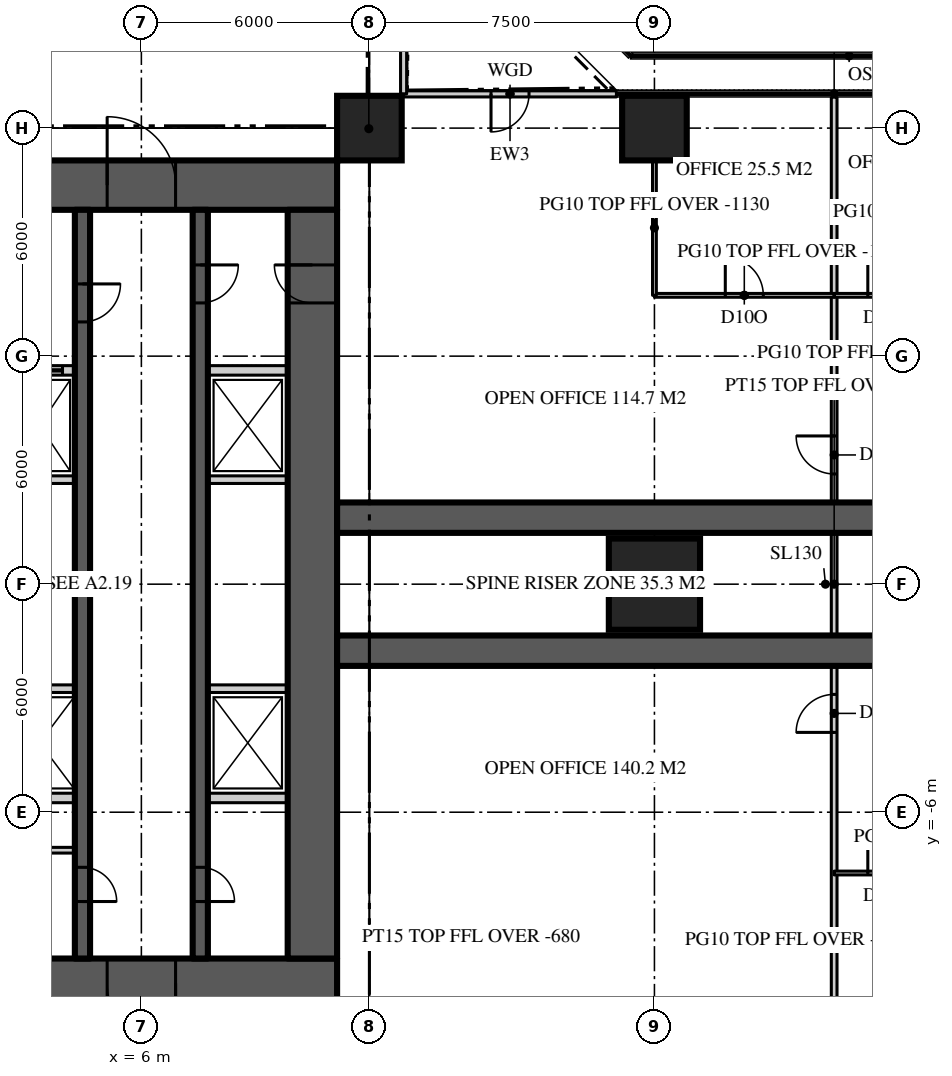
"""IFC4 building model, lengths in metres.
Left out: names, types, materials, properties, quantities, classifications, styles, units other than length and angle.
Written with IfcOpenShell. Run it as: python <this file> out.ifc"""

import sys

from ifc_helpers import new_model, si_unit, direction, frame, frame_2d, origin, origin_2d, place, context, subcontext, project, spatial, rectangle, extrude, element, fill, save


model = new_model("IFC4")
c1 = context("Model", 3, precision=1e-05, world=origin(), true_north=direction((0.0, 1.0)))
c2 = subcontext(c1, "Body", "Model", "MODEL_VIEW")
j1 = project(units=[si_unit("LENGTHUNIT", "METRE"), si_unit("PLANEANGLEUNIT", "RADIAN")], contexts=[c1])
p1 = place(None, origin())
s1 = spatial("IfcSite", under=j1, at=p1, CompositionType="ELEMENT")
p2 = place(p1, origin())
s2 = spatial("IfcBuilding", under=s1, at=p2, CompositionType="ELEMENT")
p3 = place(p2, frame((0.0, 0.0, 124.2)))
s3 = spatial("IfcBuildingStorey", under=s2, at=p3, CompositionType="ELEMENT", Elevation=124.2)
p4 = place(p3, frame((-11.15, 10.5, 0.0), z_axis=(0.0, 0.0, 1.0), x_axis=(1.0, 0.0, 0.0)))
e1 = element("IfcWall", 1, at=p4, inside=s3, PredefinedType="SHEAR", context=c2, shape_type="SweptSolid", body=[
    extrude(rectangle(XDim=22.3, YDim=1.3, at=frame_2d((11.15, 0.0))), origin(), (0.0, 0.0, 1.0), 3.9),
])
p5 = place(p4, frame((4.25, 0.0, 0.0)))
e2 = element("IfcOpeningElement", 2, at=p5, cuts=e1, PredefinedType="OPENING", context=c2, shape_type="SweptSolid", body=[
    extrude(rectangle(XDim=1.8, YDim=2.2, at=frame_2d((0.9, 1.1))), frame((0.0, 0.66, 0.0), z_axis=(0.0, -1.0, 0.0), x_axis=(1.0, 0.0, 0.0)), (0.0, 0.0, 1.0), 1.32),
])
p6 = place(p4, frame((16.25, 0.0, 0.0)))
e3 = element("IfcOpeningElement", 3, at=p6, cuts=e1, PredefinedType="OPENING", context=c2, shape_type="SweptSolid", body=[
    extrude(rectangle(XDim=1.8, YDim=2.2, at=frame_2d((0.9, 1.1))), frame((0.0, 0.66, 0.0), z_axis=(0.0, -1.0, 0.0), x_axis=(1.0, 0.0, 0.0)), (0.0, 0.0, 1.0), 1.32),
])
p7 = place(p3, frame((11.15, -10.5, 0.0), z_axis=(0.0, 0.0, 1.0), x_axis=(-1.0, 0.0, 0.0)))
e4 = element("IfcWall", 4, at=p7, inside=s3, PredefinedType="SHEAR", context=c2, shape_type="SweptSolid", body=[
    extrude(rectangle(XDim=22.3, YDim=1.3, at=frame_2d((11.15, 0.0))), origin(), (0.0, 0.0, 1.0), 3.9),
])
p8 = place(p7, frame((16.25, 0.0, 0.0)))
e5 = element("IfcOpeningElement", 5, at=p8, cuts=e4, PredefinedType="OPENING", context=c2, shape_type="SweptSolid", body=[
    extrude(rectangle(XDim=1.8, YDim=2.2, at=frame_2d((0.9, 1.1))), frame((0.0, 0.66, 0.0), z_axis=(0.0, -1.0, 0.0), x_axis=(1.0, 0.0, 0.0)), (0.0, 0.0, 1.0), 1.32),
])
p9 = place(p7, frame((4.25, 0.0, 0.0)))
e6 = element("IfcOpeningElement", 6, at=p9, cuts=e4, PredefinedType="OPENING", context=c2, shape_type="SweptSolid", body=[
    extrude(rectangle(XDim=1.8, YDim=2.2, at=frame_2d((0.9, 1.1))), frame((0.0, 0.66, 0.0), z_axis=(0.0, -1.0, 0.0), x_axis=(1.0, 0.0, 0.0)), (0.0, 0.0, 1.0), 1.32),
])
p10 = place(p3, frame((10.5, -9.85, 0.0), z_axis=(0.0, 0.0, 1.0), x_axis=(0.0, 1.0, 0.0)))
e7 = element("IfcWall", 7, at=p10, inside=s3, PredefinedType="SHEAR", context=c2, shape_type="SweptSolid", body=[
    extrude(rectangle(XDim=19.7, YDim=1.3, at=frame_2d((9.85, 0.0))), origin(), (0.0, 0.0, 1.0), 3.9),
])
p11 = place(p10, frame((17.25, 0.0, 0.0)))
e8 = element("IfcOpeningElement", 8, at=p11, cuts=e7, PredefinedType="OPENING", context=c2, shape_type="SweptSolid", body=[
    extrude(rectangle(XDim=1.0, YDim=2.2, at=frame_2d((0.5, 1.1))), frame((0.0, 0.66, 0.0), z_axis=(0.0, -1.0, 0.0), x_axis=(1.0, 0.0, 0.0)), (0.0, 0.0, 1.0), 1.32),
])
for number, where, z_axis, x_axis in (
    (9, (11.15, -1.75, 0.0), (0.0, 0.0, 1.0), (1.0, 0.0, 0.0)),
    (10, (11.15, 1.75, 0.0), (0.0, 0.0, 1.0), (1.0, 0.0, 0.0)),
):
    element("IfcWall", number, at=place(p3, frame(where, z_axis=z_axis, x_axis=x_axis)), inside=s3, PredefinedType="SHEAR", context=c2, shape_type="SweptSolid", body=[
        extrude(rectangle(XDim=15.25, YDim=0.8, at=frame_2d((7.625, 0.0))), origin(), (0.0, 0.0, 1.0), 3.9),
    ])
p12 = place(p3, frame((19.5, 0.0, 0.0), z_axis=(0.0, 0.0, 1.0), x_axis=(1.0, 0.0, 0.0)))
e11 = element("IfcColumn", 11, at=p12, inside=s3, PredefinedType="COLUMN", context=c2, shape_type="SweptSolid", body=[
    extrude(rectangle(XDim=2.4, YDim=2.4, at=origin_2d()), origin(), (0.0, 0.0, 1.0), 3.9),
])
for number, where, z_axis, x_axis in (
    (12, (12.0, 12.0, 0.0), (0.0, 0.0, 1.0), (1.0, 0.0, 0.0)),
    (13, (19.5, 12.0, 0.0), (0.0, 0.0, 1.0), (1.0, 0.0, 0.0)),
):
    element("IfcColumn", number, at=place(p3, frame(where, z_axis=z_axis, x_axis=x_axis)), inside=s3, PredefinedType="COLUMN", context=c2, shape_type="SweptSolid", body=[
        extrude(rectangle(XDim=1.7, YDim=1.7, at=origin_2d()), origin(), (0.0, 0.0, 1.0), 3.9),
    ])
p13 = place(p3, frame((18.5, 12.9, 0.0), z_axis=(0.0, 0.0, 1.0), x_axis=(-1.0, 0.0, 0.0)))
e14 = element("IfcWall", 14, at=p13, inside=s3, PredefinedType="SOLIDWALL", context=c2, shape_type="SweptSolid", body=[
    extrude(rectangle(XDim=5.6, YDim=0.16, at=frame_2d((2.8, 0.0))), origin(), (0.0, 0.0, 1.0), 3.77),
])
p14 = place(p13, frame((2.3, 0.0, 0.0)))
e15 = element("IfcOpeningElement", 15, at=p14, cuts=e14, PredefinedType="OPENING", context=c2, shape_type="SweptSolid", body=[
    extrude(rectangle(XDim=1.0, YDim=2.2, at=frame_2d((0.5, 1.1))), frame((0.0, 0.09, 0.0), z_axis=(0.0, -1.0, 0.0), x_axis=(1.0, 0.0, 0.0)), (0.0, 0.0, 1.0), 0.18),
])
p15 = place(p3, frame((12.9, 12.9, 0.0), z_axis=(0.0, 0.0, 1.0), x_axis=(0.0, 1.0, 0.0)))
e16 = element("IfcWall", 16, at=p15, inside=s3, PredefinedType="SOLIDWALL", context=c2, shape_type="SweptSolid", body=[
    extrude(rectangle(XDim=5.6, YDim=0.16, at=frame_2d((2.8, 0.0))), origin(), (0.0, 0.0, 1.0), 3.77),
])
p16 = place(p3, frame((7.55, 9.85, 0.0), z_axis=(0.0, 0.0, 1.0), x_axis=(0.0, -1.0, 0.0)))
e17 = element("IfcWall", 17, at=p16, inside=s3, PredefinedType="SHEAR", context=c2, shape_type="SweptSolid", body=[
    extrude(rectangle(XDim=19.7, YDim=0.4, at=frame_2d((9.85, 0.0))), origin(), (0.0, 0.0, 1.0), 3.9),
])
p17 = place(p16, frame((1.45, 0.0, 0.0)))
e18 = element("IfcOpeningElement", 18, at=p17, cuts=e17, PredefinedType="OPENING", context=c2, shape_type="SweptSolid", body=[
    extrude(rectangle(XDim=1.0, YDim=2.2, at=frame_2d((0.5, 1.1))), frame((0.0, 0.21, 0.0), z_axis=(0.0, -1.0, 0.0), x_axis=(1.0, 0.0, 0.0)), (0.0, 0.0, 1.0), 0.42),
])
p18 = place(p16, frame((17.3, 0.0, 0.0)))
e19 = element("IfcOpeningElement", 19, at=p18, cuts=e17, PredefinedType="OPENING", context=c2, shape_type="SweptSolid", body=[
    extrude(rectangle(XDim=0.9, YDim=2.1, at=frame_2d((0.45, 1.05))), frame((0.0, 0.21, 0.0), z_axis=(0.0, -1.0, 0.0), x_axis=(1.0, 0.0, 0.0)), (0.0, 0.0, 1.0), 0.42),
])
p19 = place(p3, frame((4.45, 9.85, 0.0), z_axis=(0.0, 0.0, 1.0), x_axis=(0.0, -1.0, 0.0)))
e20 = element("IfcWall", 20, at=p19, inside=s3, PredefinedType="SHEAR", context=c2, shape_type="SweptSolid", body=[
    extrude(rectangle(XDim=19.7, YDim=0.4, at=frame_2d((9.85, 0.0))), origin(), (0.0, 0.0, 1.0), 3.9),
])
p20 = place(p19, frame((1.95, 0.0, 0.0)))
e21 = element("IfcOpeningElement", 21, at=p20, cuts=e20, PredefinedType="OPENING", context=c2, shape_type="SweptSolid", body=[
    extrude(rectangle(XDim=1.0, YDim=2.2, at=frame_2d((0.5, 1.1))), frame((0.0, 0.21, 0.0), z_axis=(0.0, -1.0, 0.0), x_axis=(1.0, 0.0, 0.0)), (0.0, 0.0, 1.0), 0.42),
])
p21 = place(p19, frame((17.3, 0.0, 0.0)))
e22 = element("IfcOpeningElement", 22, at=p21, cuts=e20, PredefinedType="OPENING", context=c2, shape_type="SweptSolid", body=[
    extrude(rectangle(XDim=0.9, YDim=2.1, at=frame_2d((0.45, 1.05))), frame((0.0, 0.21, 0.0), z_axis=(0.0, -1.0, 0.0), x_axis=(1.0, 0.0, 0.0)), (0.0, 0.0, 1.0), 0.42),
])
p22 = place(p3, frame((2.4, 5.625, 0.0), z_axis=(0.0, 0.0, 1.0), x_axis=(1.0, 0.0, 0.0)))
e23 = element("IfcWall", 23, at=p22, inside=s3, PredefinedType="SOLIDWALL", context=c2, shape_type="SweptSolid", body=[
    extrude(rectangle(XDim=1.85, YDim=0.25, at=frame_2d((0.925, 0.0))), origin(), (0.0, 0.0, 1.0), 3.7),
])
p23 = place(p22, frame((0.325, 0.0, 0.0)))
e24 = element("IfcOpeningElement", 24, at=p23, cuts=e23, PredefinedType="OPENING", context=c2, shape_type="SweptSolid", body=[
    extrude(rectangle(XDim=1.2, YDim=2.2, at=frame_2d((0.6, 1.1))), frame((0.0, 0.135, 0.0), z_axis=(0.0, -1.0, 0.0), x_axis=(1.0, 0.0, 0.0)), (0.0, 0.0, 1.0), 0.27),
])
p24 = place(p3, frame((7.75, 5.625, 0.0), z_axis=(0.0, 0.0, 1.0), x_axis=(1.0, 0.0, 0.0)))
e25 = element("IfcWall", 25, at=p24, inside=s3, PredefinedType="SOLIDWALL", context=c2, shape_type="SweptSolid", body=[
    extrude(rectangle(XDim=2.1, YDim=0.25, at=frame_2d((1.05, 0.0))), origin(), (0.0, 0.0, 1.0), 3.7),
])
p25 = place(p3, frame((2.4, -5.625, 0.0), z_axis=(0.0, 0.0, 1.0), x_axis=(1.0, 0.0, 0.0)))
e26 = element("IfcWall", 26, at=p25, inside=s3, PredefinedType="SOLIDWALL", context=c2, shape_type="SweptSolid", body=[
    extrude(rectangle(XDim=1.85, YDim=0.25, at=frame_2d((0.925, 0.0))), origin(), (0.0, 0.0, 1.0), 3.7),
])
p26 = place(p3, frame((7.75, -5.625, 0.0), z_axis=(0.0, 0.0, 1.0), x_axis=(1.0, 0.0, 0.0)))
e27 = element("IfcWall", 27, at=p26, inside=s3, PredefinedType="SOLIDWALL", context=c2, shape_type="SweptSolid", body=[
    extrude(rectangle(XDim=2.1, YDim=0.25, at=frame_2d((1.05, 0.0))), origin(), (0.0, 0.0, 1.0), 3.7),
])
p27 = place(p3, frame((2.4, -2.75, 0.0), z_axis=(0.0, 0.0, 1.0), x_axis=(1.0, 0.0, 0.0)))
e28 = element("IfcWall", 28, at=p27, inside=s3, PredefinedType="SOLIDWALL", context=c2, shape_type="SweptSolid", body=[
    extrude(rectangle(XDim=1.85, YDim=0.2, at=frame_2d((0.925, 0.0))), origin(), (0.0, 0.0, 1.0), 3.7),
])
p28 = place(p3, frame((7.75, -2.75, 0.0), z_axis=(0.0, 0.0, 1.0), x_axis=(1.0, 0.0, 0.0)))
e29 = element("IfcWall", 29, at=p28, inside=s3, PredefinedType="SOLIDWALL", context=c2, shape_type="SweptSolid", body=[
    extrude(rectangle(XDim=2.1, YDim=0.2, at=frame_2d((1.05, 0.0))), origin(), (0.0, 0.0, 1.0), 3.7),
])
p29 = place(p3, frame((2.4, 2.75, 0.0), z_axis=(0.0, 0.0, 1.0), x_axis=(1.0, 0.0, 0.0)))
e30 = element("IfcWall", 30, at=p29, inside=s3, PredefinedType="SOLIDWALL", context=c2, shape_type="SweptSolid", body=[
    extrude(rectangle(XDim=1.85, YDim=0.2, at=frame_2d((0.925, 0.0))), origin(), (0.0, 0.0, 1.0), 3.7),
])
p30 = place(p3, frame((7.75, 2.75, 0.0), z_axis=(0.0, 0.0, 1.0), x_axis=(1.0, 0.0, 0.0)))
e31 = element("IfcWall", 31, at=p30, inside=s3, PredefinedType="SOLIDWALL", context=c2, shape_type="SweptSolid", body=[
    extrude(rectangle(XDim=2.1, YDim=0.2, at=frame_2d((1.05, 0.0))), origin(), (0.0, 0.0, 1.0), 3.7),
])
p31 = place(p3, frame((24.229, -12.82, 0.0), z_axis=(0.0, 0.0, 1.0), x_axis=(0.0, 1.0, 0.0)))
e32 = element("IfcWall", 32, at=p31, inside=s3, PredefinedType="PARTITIONING", context=c2, shape_type="SweptSolid", body=[
    extrude(rectangle(XDim=25.64, YDim=0.15, at=frame_2d((12.82, 0.0))), origin(), (0.0, 0.0, 1.0), 3.77),
])
p32 = place(p31, frame((15.72, 0.0, 0.0)))
e33 = element("IfcOpeningElement", 33, at=p32, cuts=e32, PredefinedType="OPENING", context=c2, shape_type="SweptSolid", body=[
    extrude(rectangle(XDim=1.0, YDim=2.2, at=frame_2d((0.5, 1.1))), frame((0.0, 0.085, 0.0), z_axis=(0.0, -1.0, 0.0), x_axis=(1.0, 0.0, 0.0)), (0.0, 0.0, 1.0), 0.17),
])
p33 = place(p31, frame((8.92, 0.0, 0.0)))
e34 = element("IfcOpeningElement", 34, at=p33, cuts=e32, PredefinedType="OPENING", context=c2, shape_type="SweptSolid", body=[
    extrude(rectangle(XDim=1.0, YDim=2.2, at=frame_2d((0.5, 1.1))), frame((0.0, 0.085, 0.0), z_axis=(0.0, -1.0, 0.0), x_axis=(1.0, 0.0, 0.0)), (0.0, 0.0, 1.0), 0.17),
])
p34 = place(p3, frame((19.5, 7.6, 0.0), z_axis=(0.0, 0.0, 1.0), x_axis=(1.0, 0.0, 0.0)))
e35 = element("IfcWall", 35, at=p34, inside=s3, PredefinedType="PARTITIONING", context=c2, shape_type="SweptSolid", body=[
    extrude(rectangle(XDim=4.729, YDim=0.1, at=frame_2d((2.365, 0.0))), origin(), (0.0, 0.0, 1.0), 3.77),
])
p35 = place(p34, frame((1.865, 0.0, 0.0)))
e36 = element("IfcOpeningElement", 36, at=p35, cuts=e35, PredefinedType="OPENING", context=c2, shape_type="SweptSolid", body=[
    extrude(rectangle(XDim=1.0, YDim=2.2, at=frame_2d((0.5, 1.1))), frame((0.0, 0.06, 0.0), z_axis=(0.0, -1.0, 0.0), x_axis=(1.0, 0.0, 0.0)), (0.0, 0.0, 1.0), 0.12),
])
p36 = place(p3, frame((24.229, 7.6, 0.0), z_axis=(0.0, 0.0, 1.0), x_axis=(1.0, 0.0, 0.0)))
e37 = element("IfcWall", 37, at=p36, inside=s3, PredefinedType="PARTITIONING", context=c2, shape_type="SweptSolid", body=[
    extrude(rectangle(XDim=5.73, YDim=0.1, at=frame_2d((2.865, 0.0))), origin(), (0.0, 0.0, 1.0), 3.77),
])
p37 = place(p36, frame((0.885, 0.0, 0.0)))
e38 = element("IfcOpeningElement", 38, at=p37, cuts=e37, PredefinedType="OPENING", context=c2, shape_type="SweptSolid", body=[
    extrude(rectangle(XDim=1.0, YDim=2.2, at=frame_2d((0.5, 1.1))), frame((0.0, 0.06, 0.0), z_axis=(0.0, -1.0, 0.0), x_axis=(1.0, 0.0, 0.0)), (0.0, 0.0, 1.0), 0.12),
])
p38 = place(p36, frame((3.75, 0.0, 0.0)))
e39 = element("IfcOpeningElement", 39, at=p38, cuts=e37, PredefinedType="OPENING", context=c2, shape_type="SweptSolid", body=[
    extrude(rectangle(XDim=1.0, YDim=2.2, at=frame_2d((0.5, 1.1))), frame((0.0, 0.06, 0.0), z_axis=(0.0, -1.0, 0.0), x_axis=(1.0, 0.0, 0.0)), (0.0, 0.0, 1.0), 0.12),
])
p39 = place(p3, frame((19.5, 7.6, 0.0), z_axis=(0.0, 0.0, 1.0), x_axis=(0.0, 1.0, 0.0)))
e40 = element("IfcWall", 40, at=p39, inside=s3, PredefinedType="PARTITIONING", context=c2, shape_type="SweptSolid", body=[
    extrude(rectangle(XDim=3.55, YDim=0.1, at=frame_2d((1.775, 0.0))), origin(), (0.0, 0.0, 1.0), 2.77),
])
p40 = place(p3, frame((24.229, -7.6, 0.0), z_axis=(0.0, 0.0, 1.0), x_axis=(1.0, 0.0, 0.0)))
e41 = element("IfcWall", 41, at=p40, inside=s3, PredefinedType="PARTITIONING", context=c2, shape_type="SweptSolid", body=[
    extrude(rectangle(XDim=5.73, YDim=0.1, at=frame_2d((2.865, 0.0))), origin(), (0.0, 0.0, 1.0), 3.77),
])
p41 = place(p40, frame((0.885, 0.0, 0.0)))
e42 = element("IfcOpeningElement", 42, at=p41, cuts=e41, PredefinedType="OPENING", context=c2, shape_type="SweptSolid", body=[
    extrude(rectangle(XDim=1.0, YDim=2.2, at=frame_2d((0.5, 1.1))), frame((0.0, 0.06, 0.0), z_axis=(0.0, -1.0, 0.0), x_axis=(1.0, 0.0, 0.0)), (0.0, 0.0, 1.0), 0.12),
])
p42 = place(p40, frame((3.75, 0.0, 0.0)))
e43 = element("IfcOpeningElement", 43, at=p42, cuts=e41, PredefinedType="OPENING", context=c2, shape_type="SweptSolid", body=[
    extrude(rectangle(XDim=1.0, YDim=2.2, at=frame_2d((0.5, 1.1))), frame((0.0, 0.06, 0.0), z_axis=(0.0, -1.0, 0.0), x_axis=(1.0, 0.0, 0.0)), (0.0, 0.0, 1.0), 0.12),
])
p43 = place(p3, frame((11.15, 11.15, 0.0), z_axis=(0.0, 0.0, 1.0), x_axis=(0.707106781187, 0.707106781187, 0.0)))
e44 = element("IfcWall", 44, at=p43, inside=s3, PredefinedType="PARTITIONING", context=c2, shape_type="SweptSolid", body=[
    extrude(rectangle(XDim=2.362, YDim=0.15, at=frame_2d((1.181, 0.0))), origin(), (0.0, 0.0, 1.0), 3.22),
])
p44 = place(p3, frame((2.4, -7.0, 0.0), z_axis=(0.0, 0.0, 1.0), x_axis=(1.0, 0.0, 0.0)))
e45 = element("IfcWall", 45, at=p44, inside=s3, PredefinedType="SOLIDWALL", context=c2, shape_type="SweptSolid", body=[
    extrude(rectangle(XDim=1.85, YDim=0.15, at=frame_2d((0.925, 0.0))), origin(), (0.0, 0.0, 1.0), 3.77),
])
p45 = place(p44, frame((0.1, 0.0, 0.0)))
e46 = element("IfcOpeningElement", 46, at=p45, cuts=e45, PredefinedType="OPENING", context=c2, shape_type="SweptSolid", body=[
    extrude(rectangle(XDim=0.9, YDim=2.1, at=frame_2d((0.45, 1.05))), frame((0.0, 0.085, 0.0), z_axis=(0.0, -1.0, 0.0), x_axis=(1.0, 0.0, 0.0)), (0.0, 0.0, 1.0), 0.17),
])
p46 = place(p14, origin())
e47 = element("IfcDoor", 47, at=p46, inside=s3, OperationType="SINGLE_SWING_RIGHT", PredefinedType="DOOR", context=c2, shape_type="SweptSolid", body=[
    extrude(rectangle(XDim=1.0, YDim=2.2, at=frame_2d((0.5, 1.1))), frame((0.0, 0.025, 0.0), z_axis=(0.0, -1.0, 0.0), x_axis=(1.0, 0.0, 0.0)), (0.0, 0.0, 1.0), 0.05),
])
fill(e15, e47)
p47 = place(p6, origin())
e48 = element("IfcDoor", 48, at=p47, inside=s3, OperationType="DOUBLE_DOOR_DOUBLE_SWING", PredefinedType="DOOR", context=c2, shape_type="SweptSolid", body=[
    extrude(rectangle(XDim=1.8, YDim=2.2, at=frame_2d((0.9, 1.1))), frame((0.0, 0.025, 0.0), z_axis=(0.0, -1.0, 0.0), x_axis=(1.0, 0.0, 0.0)), (0.0, 0.0, 1.0), 0.05),
])
fill(e3, e48)
p48 = place(p9, origin())
e49 = element("IfcDoor", 49, at=p48, inside=s3, OperationType="DOUBLE_DOOR_DOUBLE_SWING", PredefinedType="DOOR", context=c2, shape_type="SweptSolid", body=[
    extrude(rectangle(XDim=1.8, YDim=2.2, at=frame_2d((0.9, 1.1))), frame((0.0, 0.025, 0.0), z_axis=(0.0, -1.0, 0.0), x_axis=(1.0, 0.0, 0.0)), (0.0, 0.0, 1.0), 0.05),
])
fill(e6, e49)
p49 = place(p17, origin())
e50 = element("IfcDoor", 50, at=p49, inside=s3, OperationType="SINGLE_SWING_LEFT", PredefinedType="DOOR", context=c2, shape_type="SweptSolid", body=[
    extrude(rectangle(XDim=1.0, YDim=2.2, at=frame_2d((0.5, 1.1))), frame((0.0, 0.025, 0.0), z_axis=(0.0, -1.0, 0.0), x_axis=(1.0, 0.0, 0.0)), (0.0, 0.0, 1.0), 0.05),
])
fill(e18, e50)
p50 = place(p11, origin())
e51 = element("IfcDoor", 51, at=p50, inside=s3, OperationType="SINGLE_SWING_RIGHT", PredefinedType="DOOR", context=c2, shape_type="SweptSolid", body=[
    extrude(rectangle(XDim=1.0, YDim=2.2, at=frame_2d((0.5, 1.1))), frame((0.0, 0.025, 0.0), z_axis=(0.0, -1.0, 0.0), x_axis=(1.0, 0.0, 0.0)), (0.0, 0.0, 1.0), 0.05),
])
fill(e8, e51)
p51 = place(p20, origin())
e52 = element("IfcDoor", 52, at=p51, inside=s3, OperationType="SINGLE_SWING_LEFT", PredefinedType="DOOR", context=c2, shape_type="SweptSolid", body=[
    extrude(rectangle(XDim=1.0, YDim=2.2, at=frame_2d((0.5, 1.1))), frame((0.0, 0.025, 0.0), z_axis=(0.0, -1.0, 0.0), x_axis=(1.0, 0.0, 0.0)), (0.0, 0.0, 1.0), 0.05),
])
fill(e21, e52)
p52 = place(p18, origin())
e53 = element("IfcDoor", 53, at=p52, inside=s3, OperationType="SINGLE_SWING_RIGHT", PredefinedType="DOOR", context=c2, shape_type="SweptSolid", body=[
    extrude(rectangle(XDim=0.9, YDim=2.1, at=frame_2d((0.45, 1.05))), frame((0.0, 0.025, 0.0), z_axis=(0.0, -1.0, 0.0), x_axis=(1.0, 0.0, 0.0)), (0.0, 0.0, 1.0), 0.05),
])
fill(e19, e53)
p53 = place(p21, origin())
e54 = element("IfcDoor", 54, at=p53, inside=s3, OperationType="SINGLE_SWING_RIGHT", PredefinedType="DOOR", context=c2, shape_type="SweptSolid", body=[
    extrude(rectangle(XDim=0.9, YDim=2.1, at=frame_2d((0.45, 1.05))), frame((0.0, 0.025, 0.0), z_axis=(0.0, -1.0, 0.0), x_axis=(1.0, 0.0, 0.0)), (0.0, 0.0, 1.0), 0.05),
])
fill(e22, e54)
p54 = place(p23, origin())
e55 = element("IfcDoor", 55, at=p54, inside=s3, OperationType="SLIDING_TO_LEFT", PredefinedType="DOOR", context=c2, shape_type="SweptSolid", body=[
    extrude(rectangle(XDim=1.2, YDim=2.2, at=frame_2d((0.6, 1.1))), frame((0.0, 0.025, 0.0), z_axis=(0.0, -1.0, 0.0), x_axis=(1.0, 0.0, 0.0)), (0.0, 0.0, 1.0), 0.05),
])
fill(e24, e55)
p55 = place(p32, origin())
e56 = element("IfcDoor", 56, at=p55, inside=s3, OperationType="SINGLE_SWING_RIGHT", PredefinedType="DOOR", context=c2, shape_type="SweptSolid", body=[
    extrude(rectangle(XDim=1.0, YDim=2.2, at=frame_2d((0.5, 1.1))), frame((0.0, 0.025, 0.0), z_axis=(0.0, -1.0, 0.0), x_axis=(1.0, 0.0, 0.0)), (0.0, 0.0, 1.0), 0.05),
])
fill(e33, e56)
p56 = place(p33, origin())
e57 = element("IfcDoor", 57, at=p56, inside=s3, OperationType="SINGLE_SWING_LEFT", PredefinedType="DOOR", context=c2, shape_type="SweptSolid", body=[
    extrude(rectangle(XDim=1.0, YDim=2.2, at=frame_2d((0.5, 1.1))), frame((0.0, 0.025, 0.0), z_axis=(0.0, -1.0, 0.0), x_axis=(1.0, 0.0, 0.0)), (0.0, 0.0, 1.0), 0.05),
])
fill(e34, e57)
p57 = place(p35, origin())
e58 = element("IfcDoor", 58, at=p57, inside=s3, OperationType="SINGLE_SWING_LEFT", PredefinedType="DOOR", context=c2, shape_type="SweptSolid", body=[
    extrude(rectangle(XDim=1.0, YDim=2.2, at=frame_2d((0.5, 1.1))), frame((0.0, 0.025, 0.0), z_axis=(0.0, -1.0, 0.0), x_axis=(1.0, 0.0, 0.0)), (0.0, 0.0, 1.0), 0.05),
])
fill(e36, e58)
p58 = place(p37, origin())
e59 = element("IfcDoor", 59, at=p58, inside=s3, OperationType="SINGLE_SWING_LEFT", PredefinedType="DOOR", context=c2, shape_type="SweptSolid", body=[
    extrude(rectangle(XDim=1.0, YDim=2.2, at=frame_2d((0.5, 1.1))), frame((0.0, 0.025, 0.0), z_axis=(0.0, -1.0, 0.0), x_axis=(1.0, 0.0, 0.0)), (0.0, 0.0, 1.0), 0.05),
])
fill(e38, e59)
p59 = place(p41, origin())
e60 = element("IfcDoor", 60, at=p59, inside=s3, OperationType="SINGLE_SWING_LEFT", PredefinedType="DOOR", context=c2, shape_type="SweptSolid", body=[
    extrude(rectangle(XDim=1.0, YDim=2.2, at=frame_2d((0.5, 1.1))), frame((0.0, 0.025, 0.0), z_axis=(0.0, -1.0, 0.0), x_axis=(1.0, 0.0, 0.0)), (0.0, 0.0, 1.0), 0.05),
])
fill(e42, e60)
save(model, sys.argv[1])
